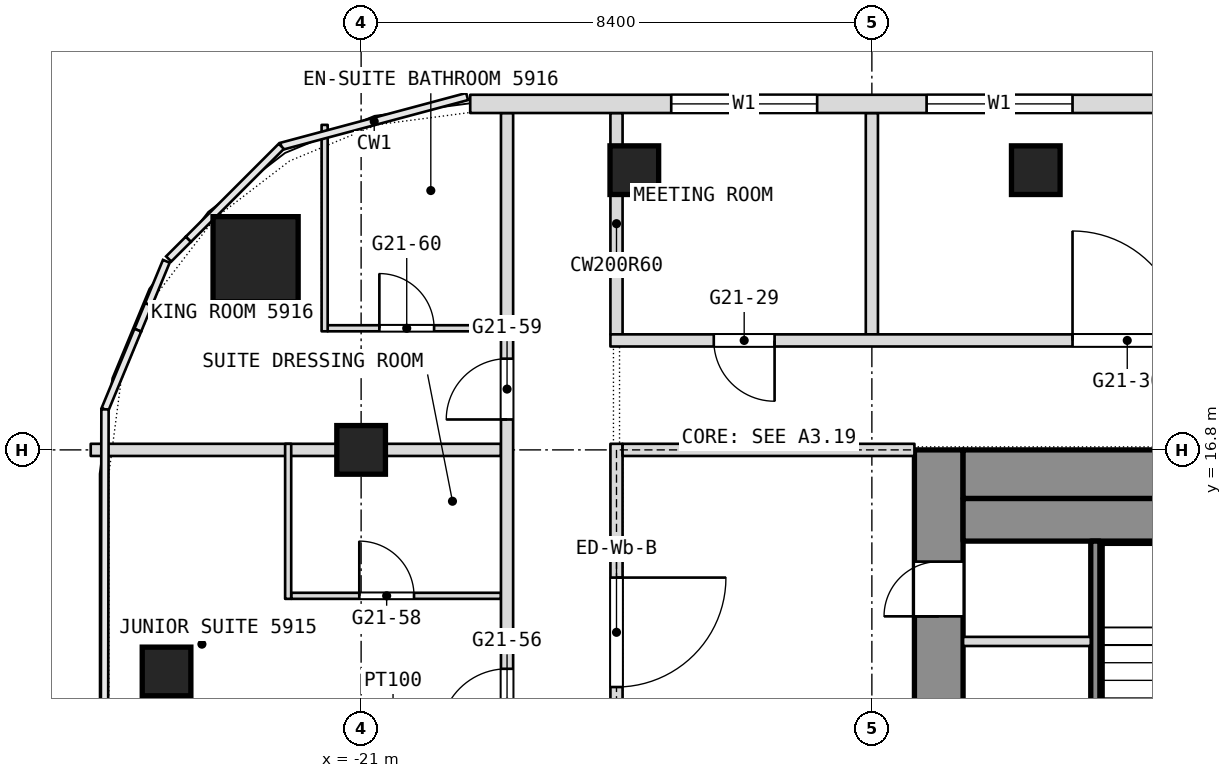
"""IFC4 building model, lengths in metres.
Left out: names, types, materials, properties, quantities, classifications, styles, units other than length and angle.
Written with IfcOpenShell. Run it as: python <this file> out.ifc"""

import sys

from ifc_helpers import new_model, si_unit, direction, frame, frame_2d, origin, origin_2d, place, context, subcontext, project, spatial, rectangle, extrude, element, fill, save


model = new_model("IFC4")
c1 = context("Model", 3, precision=1e-05, world=origin(), true_north=direction((0.0, 1.0)))
c2 = subcontext(c1, "Body", "Model", "MODEL_VIEW")
j1 = project(units=[si_unit("LENGTHUNIT", "METRE"), si_unit("PLANEANGLEUNIT", "RADIAN")], contexts=[c1])
p1 = place(None, origin())
s1 = spatial("IfcSite", under=j1, at=p1, CompositionType="ELEMENT")
p2 = place(p1, origin())
s2 = spatial("IfcBuilding", under=s1, at=p2, CompositionType="ELEMENT")
p3 = place(p2, frame((0.0, 0.0, 248.9)))
s3 = spatial("IfcBuildingStorey", under=s2, at=p3, CompositionType="ELEMENT", Elevation=248.9)
p4 = place(p3, frame((-11.5, 0.0, 0.0), z_axis=(0.0, 0.0, 1.0), x_axis=(0.0, 1.0, 0.0)))
e1 = element("IfcWall", 1, at=p4, inside=s3, PredefinedType="SHEAR", context=c2, shape_type="SweptSolid", body=[
    extrude(rectangle(XDim=16.8, YDim=0.8, at=frame_2d((8.4, 0.0))), origin(), (0.0, 0.0, 1.0), 3.6),
])
p5 = place(p4, frame((3.6, 0.0, 0.0)))
e2 = element("IfcOpeningElement", 2, at=p5, cuts=e1, PredefinedType="OPENING", context=c2, shape_type="SweptSolid", body=[
    extrude(rectangle(XDim=0.9, YDim=2.1, at=frame_2d((0.45, 1.05))), frame((0.0, 0.4, 0.0), z_axis=(0.0, -1.0, 0.0), x_axis=(1.0, 0.0, 0.0)), (0.0, 0.0, 1.0), 0.8),
])
p6 = place(p4, frame((6.825, 0.0, 0.0)))
e3 = element("IfcOpeningElement", 3, at=p6, cuts=e1, PredefinedType="OPENING", context=c2, shape_type="SweptSolid", body=[
    extrude(rectangle(XDim=1.2, YDim=2.1, at=frame_2d((0.6, 1.05))), frame((0.0, 0.4, 0.0), z_axis=(0.0, -1.0, 0.0), x_axis=(1.0, 0.0, 0.0)), (0.0, 0.0, 1.0), 0.8),
])
p7 = place(p4, frame((14.062, 0.0, 0.0)))
e4 = element("IfcOpeningElement", 4, at=p7, cuts=e1, PredefinedType="OPENING", context=c2, shape_type="SweptSolid", body=[
    extrude(rectangle(XDim=0.9, YDim=2.1, at=frame_2d((0.45, 1.05))), frame((0.0, 0.4, 0.0), z_axis=(0.0, -1.0, 0.0), x_axis=(1.0, 0.0, 0.0)), (0.0, 0.0, 1.0), 0.8),
])
p8 = place(p4, frame((11.438, 0.0, 0.0)))
e5 = element("IfcOpeningElement", 5, at=p8, cuts=e1, PredefinedType="OPENING", context=c2, shape_type="SweptSolid", body=[
    extrude(rectangle(XDim=0.9, YDim=2.1, at=frame_2d((0.45, 1.05))), frame((0.0, 0.4, 0.0), z_axis=(0.0, -1.0, 0.0), x_axis=(1.0, 0.0, 0.0)), (0.0, 0.0, 1.0), 0.8),
])
p9 = place(p4, frame((8.775, 0.0, 0.0)))
e6 = element("IfcOpeningElement", 6, at=p9, cuts=e1, PredefinedType="OPENING", context=c2, shape_type="SweptSolid", body=[
    extrude(rectangle(XDim=1.2, YDim=2.1, at=frame_2d((0.6, 1.05))), frame((0.0, 0.4, 0.0), z_axis=(0.0, -1.0, 0.0), x_axis=(1.0, 0.0, 0.0)), (0.0, 0.0, 1.0), 0.8),
])
p10 = place(p3, frame((-11.1, 16.4, 0.0), z_axis=(0.0, 0.0, 1.0), x_axis=(1.0, 0.0, 0.0)))
e7 = element("IfcWall", 7, at=p10, inside=s3, PredefinedType="SHEAR", context=c2, shape_type="SweptSolid", body=[
    extrude(rectangle(XDim=22.2, YDim=0.8, at=frame_2d((11.1, 0.0))), origin(), (0.0, 0.0, 1.0), 3.6),
])
p11 = place(p3, frame((-22.736, 19.936, 0.0), z_axis=(0.0, 0.0, 1.0), x_axis=(1.0, 0.0, 0.0)))
e8 = element("IfcColumn", 8, at=p11, inside=s3, PredefinedType="COLUMN", context=c2, shape_type="SweptSolid", body=[
    extrude(rectangle(XDim=1.4, YDim=1.4, at=origin_2d()), origin(), (0.0, 0.0, 1.0), 3.6),
])
for number, where, z_axis, x_axis in (
    (9, (-21.0, 16.8, 0.0), (0.0, 0.0, 1.0), (1.0, 0.0, 0.0)),
    (10, (-24.2, 13.156, 0.0), (0.0, 0.0, 1.0), (1.0, 0.0, 0.0)),
    (11, (-16.507, 21.4, 0.0), (0.0, 0.0, 1.0), (1.0, 0.0, 0.0)),
    (12, (-9.904, 21.4, 0.0), (0.0, 0.0, 1.0), (1.0, 0.0, 0.0)),
):
    element("IfcColumn", number, at=place(p3, frame(where, z_axis=z_axis, x_axis=x_axis)), inside=s3, PredefinedType="COLUMN", context=c2, shape_type="SweptSolid", body=[
        extrude(rectangle(XDim=0.8, YDim=0.8, at=origin_2d()), origin(), (0.0, 0.0, 1.0), 3.6),
    ])
p12 = place(p3, frame((-12.6, 18.7, 0.0), z_axis=(0.0, 0.0, 1.0), x_axis=(0.0, 1.0, 0.0)))
e13 = element("IfcWall", 13, at=p12, inside=s3, PredefinedType="PARTITIONING", context=c2, shape_type="SweptSolid", body=[
    extrude(rectangle(XDim=3.64, YDim=0.2, at=frame_2d((1.82, 0.0))), origin(), (0.0, 0.0, 1.0), 3.3),
])
p13 = place(p3, frame((-22.15, 14.4, 0.0), z_axis=(0.0, 0.0, 1.0), x_axis=(1.0, 0.0, 0.0)))
e14 = element("IfcWall", 14, at=p13, inside=s3, PredefinedType="PARTITIONING", context=c2, shape_type="SweptSolid", body=[
    extrude(rectangle(XDim=3.45, YDim=0.1, at=frame_2d((1.725, 0.0))), origin(), (0.0, 0.0, 1.0), 3.3),
])
p14 = place(p13, frame((1.12, 0.0, 0.0)))
e15 = element("IfcOpeningElement", 15, at=p14, cuts=e14, PredefinedType="OPENING", context=c2, shape_type="SweptSolid", body=[
    extrude(rectangle(XDim=0.9, YDim=2.1, at=frame_2d((0.45, 1.05))), frame((0.0, 0.05, 0.0), z_axis=(0.0, -1.0, 0.0), x_axis=(1.0, 0.0, 0.0)), (0.0, 0.0, 1.0), 0.1),
])
p15 = place(p3, frame((-16.8, 18.7, 0.0), z_axis=(0.0, 0.0, 1.0), x_axis=(0.0, 1.0, 0.0)))
e16 = element("IfcWall", 16, at=p15, inside=s3, PredefinedType="PARTITIONING", context=c2, shape_type="SweptSolid", body=[
    extrude(rectangle(XDim=3.64, YDim=0.2, at=frame_2d((1.82, 0.0))), origin(), (0.0, 0.0, 1.0), 3.3),
])
p16 = place(p3, frame((-25.447, 16.8, 0.0), z_axis=(0.0, 0.0, 1.0), x_axis=(1.0, 0.0, 0.0)))
e17 = element("IfcWall", 17, at=p16, inside=s3, PredefinedType="PARTITIONING", context=c2, shape_type="SweptSolid", body=[
    extrude(rectangle(XDim=6.747, YDim=0.2, at=frame_2d((3.374, 0.0))), origin(), (0.0, 0.0, 1.0), 2.9),
])
p17 = place(p3, frame((-18.6, -26.751, 0.0), z_axis=(0.0, 0.0, 1.0), x_axis=(0.0, 1.0, 0.0)))
e18 = element("IfcWall", 18, at=p17, inside=s3, PredefinedType="PARTITIONING", context=c2, shape_type="SweptSolid", body=[
    extrude(rectangle(XDim=49.091, YDim=0.2, at=frame_2d((24.545, 0.0))), origin(), (0.0, 0.0, 1.0), 3.3),
])
p18 = place(p17, frame((4.576, 0.0, 0.0)))
e19 = element("IfcOpeningElement", 19, at=p18, cuts=e18, PredefinedType="OPENING", context=c2, shape_type="SweptSolid", body=[
    extrude(rectangle(XDim=1.1, YDim=2.1, at=frame_2d((0.55, 1.05))), frame((0.0, 0.1, 0.0), z_axis=(0.0, -1.0, 0.0), x_axis=(1.0, 0.0, 0.0)), (0.0, 0.0, 1.0), 0.2),
])
p19 = place(p17, frame((13.551, 0.0, 0.0)))
e20 = element("IfcOpeningElement", 20, at=p19, cuts=e18, PredefinedType="OPENING", context=c2, shape_type="SweptSolid", body=[
    extrude(rectangle(XDim=1.1, YDim=2.1, at=frame_2d((0.55, 1.05))), frame((0.0, 0.1, 0.0), z_axis=(0.0, -1.0, 0.0), x_axis=(1.0, 0.0, 0.0)), (0.0, 0.0, 1.0), 0.2),
])
p20 = place(p17, frame((22.051, 0.0, 0.0)))
e21 = element("IfcOpeningElement", 21, at=p20, cuts=e18, PredefinedType="OPENING", context=c2, shape_type="SweptSolid", body=[
    extrude(rectangle(XDim=1.1, YDim=2.1, at=frame_2d((0.55, 1.05))), frame((0.0, 0.1, 0.0), z_axis=(0.0, -1.0, 0.0), x_axis=(1.0, 0.0, 0.0)), (0.0, 0.0, 1.0), 0.2),
])
p21 = place(p17, frame((30.351, 0.0, 0.0)))
e22 = element("IfcOpeningElement", 22, at=p21, cuts=e18, PredefinedType="OPENING", context=c2, shape_type="SweptSolid", body=[
    extrude(rectangle(XDim=1.1, YDim=2.1, at=frame_2d((0.55, 1.05))), frame((0.0, 0.1, 0.0), z_axis=(0.0, -1.0, 0.0), x_axis=(1.0, 0.0, 0.0)), (0.0, 0.0, 1.0), 0.2),
])
p22 = place(p17, frame((38.851, 0.0, 0.0)))
e23 = element("IfcOpeningElement", 23, at=p22, cuts=e18, PredefinedType="OPENING", context=c2, shape_type="SweptSolid", body=[
    extrude(rectangle(XDim=1.1, YDim=2.1, at=frame_2d((0.55, 1.05))), frame((0.0, 0.1, 0.0), z_axis=(0.0, -1.0, 0.0), x_axis=(1.0, 0.0, 0.0)), (0.0, 0.0, 1.0), 0.2),
])
p23 = place(p17, frame((44.051, 0.0, 0.0)))
e24 = element("IfcOpeningElement", 24, at=p23, cuts=e18, PredefinedType="OPENING", context=c2, shape_type="SweptSolid", body=[
    extrude(rectangle(XDim=1.0, YDim=2.1, at=frame_2d((0.5, 1.05))), frame((0.0, 0.1, 0.0), z_axis=(0.0, -1.0, 0.0), x_axis=(1.0, 0.0, 0.0)), (0.0, 0.0, 1.0), 0.2),
])
p24 = place(p3, frame((-16.9, 18.6, 0.0), z_axis=(0.0, 0.0, 1.0), x_axis=(1.0, 0.0, 0.0)))
e25 = element("IfcWall", 25, at=p24, inside=s3, PredefinedType="PARTITIONING", context=c2, shape_type="SweptSolid", body=[
    extrude(rectangle(XDim=33.8, YDim=0.2, at=frame_2d((16.9, 0.0))), origin(), (0.0, 0.0, 1.0), 3.3),
])
p25 = place(p24, frame((1.7, 0.0, 0.0)))
e26 = element("IfcOpeningElement", 26, at=p25, cuts=e25, PredefinedType="OPENING", context=c2, shape_type="SweptSolid", body=[
    extrude(rectangle(XDim=1.0, YDim=2.1, at=frame_2d((0.5, 1.05))), frame((0.0, 0.1, 0.0), z_axis=(0.0, -1.0, 0.0), x_axis=(1.0, 0.0, 0.0)), (0.0, 0.0, 1.0), 0.2),
])
p26 = place(p24, frame((7.6, 0.0, 0.0)))
e27 = element("IfcOpeningElement", 27, at=p26, cuts=e25, PredefinedType="OPENING", context=c2, shape_type="SweptSolid", body=[
    extrude(rectangle(XDim=1.8, YDim=2.1, at=frame_2d((0.9, 1.05))), frame((0.0, 0.1, 0.0), z_axis=(0.0, -1.0, 0.0), x_axis=(1.0, 0.0, 0.0)), (0.0, 0.0, 1.0), 0.2),
])
p27 = place(p24, frame((16.0, 0.0, 0.0)))
e28 = element("IfcOpeningElement", 28, at=p27, cuts=e25, PredefinedType="OPENING", context=c2, shape_type="SweptSolid", body=[
    extrude(rectangle(XDim=1.8, YDim=2.1, at=frame_2d((0.9, 1.05))), frame((0.0, 0.1, 0.0), z_axis=(0.0, -1.0, 0.0), x_axis=(1.0, 0.0, 0.0)), (0.0, 0.0, 1.0), 0.2),
])
p28 = place(p24, frame((31.1, 0.0, 0.0)))
e29 = element("IfcOpeningElement", 29, at=p28, cuts=e25, PredefinedType="OPENING", context=c2, shape_type="SweptSolid", body=[
    extrude(rectangle(XDim=1.0, YDim=2.1, at=frame_2d((0.5, 1.05))), frame((0.0, 0.1, 0.0), z_axis=(0.0, -1.0, 0.0), x_axis=(1.0, 0.0, 0.0)), (0.0, 0.0, 1.0), 0.2),
])
p29 = place(p24, frame((22.7, 0.0, 0.0)))
e30 = element("IfcOpeningElement", 30, at=p29, cuts=e25, PredefinedType="OPENING", context=c2, shape_type="SweptSolid", body=[
    extrude(rectangle(XDim=1.0, YDim=2.1, at=frame_2d((0.5, 1.05))), frame((0.0, 0.1, 0.0), z_axis=(0.0, -1.0, 0.0), x_axis=(1.0, 0.0, 0.0)), (0.0, 0.0, 1.0), 0.2),
])
p30 = place(p24, frame((26.9, 0.0, 0.0)))
e31 = element("IfcOpeningElement", 31, at=p30, cuts=e25, PredefinedType="OPENING", context=c2, shape_type="SweptSolid", body=[
    extrude(rectangle(XDim=1.0, YDim=2.1, at=frame_2d((0.5, 1.05))), frame((0.0, 0.1, 0.0), z_axis=(0.0, -1.0, 0.0), x_axis=(1.0, 0.0, 0.0)), (0.0, 0.0, 1.0), 0.2),
])
p31 = place(p3, frame((-21.55, 18.8, 0.0), z_axis=(0.0, 0.0, 1.0), x_axis=(1.0, 0.0, 0.0)))
e32 = element("IfcWall", 32, at=p31, inside=s3, PredefinedType="PARTITIONING", context=c2, shape_type="SweptSolid", body=[
    extrude(rectangle(XDim=2.85, YDim=0.1, at=frame_2d((1.425, 0.0))), origin(), (0.0, 0.0, 1.0), 3.3),
])
p32 = place(p31, frame((0.85, 0.0, 0.0)))
e33 = element("IfcOpeningElement", 33, at=p32, cuts=e32, PredefinedType="OPENING", context=c2, shape_type="SweptSolid", body=[
    extrude(rectangle(XDim=0.9, YDim=2.1, at=frame_2d((0.45, 1.05))), frame((0.0, 0.05, 0.0), z_axis=(0.0, -1.0, 0.0), x_axis=(1.0, 0.0, 0.0)), (0.0, 0.0, 1.0), 0.1),
])
p33 = place(p3, frame((-21.6, 18.75, 0.0), z_axis=(0.0, 0.0, 1.0), x_axis=(0.0, 1.0, 0.0)))
e34 = element("IfcWall", 34, at=p33, inside=s3, PredefinedType="PARTITIONING", context=c2, shape_type="SweptSolid", body=[
    extrude(rectangle(XDim=3.395, YDim=0.1, at=frame_2d((1.698, 0.0))), origin(), (0.0, 0.0, 1.0), 3.3),
])
p34 = place(p3, frame((-22.2, 14.35, 0.0), z_axis=(0.0, 0.0, 1.0), x_axis=(0.0, 1.0, 0.0)))
e35 = element("IfcWall", 35, at=p34, inside=s3, PredefinedType="PARTITIONING", context=c2, shape_type="SweptSolid", body=[
    extrude(rectangle(XDim=2.55, YDim=0.1, at=frame_2d((1.275, 0.0))), origin(), (0.0, 0.0, 1.0), 3.3),
])
p35 = place(p3, frame((19.206, 22.49, 0.0), z_axis=(0.0, 0.0, 1.0), x_axis=(-1.0, 0.0, 0.0)))
e36 = element("IfcWall", 36, at=p35, inside=s3, PredefinedType="NOTDEFINED", context=c2, shape_type="SweptSolid", body=[
    extrude(rectangle(XDim=38.412, YDim=0.3, at=frame_2d((19.206, 0.0))), origin(), (0.0, 0.0, 1.0), 3.6),
])
p36 = place(p35, frame((3.306, 0.0, 0.9)))
e37 = element("IfcOpeningElement", 37, at=p36, cuts=e36, PredefinedType="OPENING", context=c2, shape_type="SweptSolid", body=[
    extrude(rectangle(XDim=2.4, YDim=2.1, at=frame_2d((1.2, 1.05))), frame((0.0, 0.15, 0.0), z_axis=(0.0, -1.0, 0.0), x_axis=(1.0, 0.0, 0.0)), (0.0, 0.0, 1.0), 0.3),
])
p37 = place(p35, frame((7.506, 0.0, 0.9)))
e38 = element("IfcOpeningElement", 38, at=p37, cuts=e36, PredefinedType="OPENING", context=c2, shape_type="SweptSolid", body=[
    extrude(rectangle(XDim=2.4, YDim=2.1, at=frame_2d((1.2, 1.05))), frame((0.0, 0.15, 0.0), z_axis=(0.0, -1.0, 0.0), x_axis=(1.0, 0.0, 0.0)), (0.0, 0.0, 1.0), 0.3),
])
p38 = place(p35, frame((11.706, 0.0, 0.9)))
e39 = element("IfcOpeningElement", 39, at=p38, cuts=e36, PredefinedType="OPENING", context=c2, shape_type="SweptSolid", body=[
    extrude(rectangle(XDim=2.4, YDim=2.1, at=frame_2d((1.2, 1.05))), frame((0.0, 0.15, 0.0), z_axis=(0.0, -1.0, 0.0), x_axis=(1.0, 0.0, 0.0)), (0.0, 0.0, 1.0), 0.3),
])
p39 = place(p35, frame((15.906, 0.0, 0.9)))
e40 = element("IfcOpeningElement", 40, at=p39, cuts=e36, PredefinedType="OPENING", context=c2, shape_type="SweptSolid", body=[
    extrude(rectangle(XDim=2.4, YDim=2.1, at=frame_2d((1.2, 1.05))), frame((0.0, 0.15, 0.0), z_axis=(0.0, -1.0, 0.0), x_axis=(1.0, 0.0, 0.0)), (0.0, 0.0, 1.0), 0.3),
])
p40 = place(p35, frame((20.106, 0.0, 0.9)))
e41 = element("IfcOpeningElement", 41, at=p40, cuts=e36, PredefinedType="OPENING", context=c2, shape_type="SweptSolid", body=[
    extrude(rectangle(XDim=2.4, YDim=2.1, at=frame_2d((1.2, 1.05))), frame((0.0, 0.15, 0.0), z_axis=(0.0, -1.0, 0.0), x_axis=(1.0, 0.0, 0.0)), (0.0, 0.0, 1.0), 0.3),
])
p41 = place(p35, frame((24.306, 0.0, 0.9)))
e42 = element("IfcOpeningElement", 42, at=p41, cuts=e36, PredefinedType="OPENING", context=c2, shape_type="SweptSolid", body=[
    extrude(rectangle(XDim=2.4, YDim=2.1, at=frame_2d((1.2, 1.05))), frame((0.0, 0.15, 0.0), z_axis=(0.0, -1.0, 0.0), x_axis=(1.0, 0.0, 0.0)), (0.0, 0.0, 1.0), 0.3),
])
p42 = place(p35, frame((28.506, 0.0, 0.9)))
e43 = element("IfcOpeningElement", 43, at=p42, cuts=e36, PredefinedType="OPENING", context=c2, shape_type="SweptSolid", body=[
    extrude(rectangle(XDim=2.4, YDim=2.1, at=frame_2d((1.2, 1.05))), frame((0.0, 0.15, 0.0), z_axis=(0.0, -1.0, 0.0), x_axis=(1.0, 0.0, 0.0)), (0.0, 0.0, 1.0), 0.3),
])
p43 = place(p35, frame((32.706, 0.0, 0.9)))
e44 = element("IfcOpeningElement", 44, at=p43, cuts=e36, PredefinedType="OPENING", context=c2, shape_type="SweptSolid", body=[
    extrude(rectangle(XDim=2.4, YDim=2.1, at=frame_2d((1.2, 1.05))), frame((0.0, 0.15, 0.0), z_axis=(0.0, -1.0, 0.0), x_axis=(1.0, 0.0, 0.0)), (0.0, 0.0, 1.0), 0.3),
])
p44 = place(p3, frame((-11.1, 15.65, 0.0), z_axis=(0.0, 0.0, 1.0), x_axis=(1.0, 0.0, 0.0)))
e45 = element("IfcWall", 45, at=p44, inside=s3, PredefinedType="PARTITIONING", context=c2, shape_type="SweptSolid", body=[
    extrude(rectangle(XDim=22.2, YDim=0.7, at=frame_2d((11.1, 0.0))), origin(), (0.0, 0.0, 1.0), 3.3),
])
p45 = place(p3, frame((-8.925, 8.7, 0.0), z_axis=(0.0, 0.0, 1.0), x_axis=(0.0, 1.0, 0.0)))
e46 = element("IfcWall", 46, at=p45, inside=s3, PredefinedType="SHEAR", context=c2, shape_type="SweptSolid", body=[
    extrude(rectangle(XDim=6.6, YDim=0.15, at=frame_2d((3.3, 0.0))), origin(), (0.0, 0.0, 1.0), 3.3),
])
p46 = place(p45, frame((0.075, 0.0, 0.0)))
e47 = element("IfcOpeningElement", 47, at=p46, cuts=e46, PredefinedType="OPENING", context=c2, shape_type="SweptSolid", body=[
    extrude(rectangle(XDim=1.2, YDim=2.1, at=frame_2d((0.6, 1.05))), frame((0.0, 0.075, 0.0), z_axis=(0.0, -1.0, 0.0), x_axis=(1.0, 0.0, 0.0)), (0.0, 0.0, 1.0), 0.15),
])
p47 = place(p3, frame((-11.1, 13.65, 0.0), z_axis=(0.0, 0.0, 1.0), x_axis=(1.0, 0.0, 0.0)))
e48 = element("IfcWall", 48, at=p47, inside=s3, PredefinedType="PARTITIONING", context=c2, shape_type="SweptSolid", body=[
    extrude(rectangle(XDim=2.1, YDim=0.15, at=frame_2d((1.05, 0.0))), origin(), (0.0, 0.0, 1.0), 3.3),
])
p48 = place(p3, frame((-16.8, -0.1, 0.0), z_axis=(0.0, 0.0, 1.0), x_axis=(0.0, 1.0, 0.0)))
e49 = element("IfcWall", 49, at=p48, inside=s3, PredefinedType="PARTITIONING", context=c2, shape_type="SweptSolid", body=[
    extrude(rectangle(XDim=17.0, YDim=0.2, at=frame_2d((8.5, 0.0))), origin(), (0.0, 0.0, 1.0), 3.3),
])
p49 = place(p48, frame((2.2, 0.0, 0.0)))
e50 = element("IfcOpeningElement", 50, at=p49, cuts=e49, PredefinedType="OPENING", context=c2, shape_type="SweptSolid", body=[
    extrude(rectangle(XDim=1.8, YDim=2.1, at=frame_2d((0.9, 1.05))), frame((0.0, 0.1, 0.0), z_axis=(0.0, -1.0, 0.0), x_axis=(1.0, 0.0, 0.0)), (0.0, 0.0, 1.0), 0.2),
])
p50 = place(p48, frame((13.0, 0.0, 0.0)))
e51 = element("IfcOpeningElement", 51, at=p50, cuts=e49, PredefinedType="OPENING", context=c2, shape_type="SweptSolid", body=[
    extrude(rectangle(XDim=1.8, YDim=2.1, at=frame_2d((0.9, 1.05))), frame((0.0, 0.1, 0.0), z_axis=(0.0, -1.0, 0.0), x_axis=(1.0, 0.0, 0.0)), (0.0, 0.0, 1.0), 0.2),
])
p51 = place(p3, frame((-16.7, 16.8, 0.0), z_axis=(0.0, 0.0, 1.0), x_axis=(1.0, 0.0, 0.0)))
e52 = element("IfcWall", 52, at=p51, inside=s3, PredefinedType="PARTITIONING", context=c2, shape_type="SweptSolid", body=[
    extrude(rectangle(XDim=4.8, YDim=0.2, at=frame_2d((2.4, 0.0))), origin(), (0.0, 0.0, 1.0), 2.9),
])
p52 = place(p14, origin())
e53 = element("IfcDoor", 53, at=p52, inside=s3, OperationType="SINGLE_SWING_LEFT", PredefinedType="DOOR", context=c2, shape_type="SweptSolid", body=[
    extrude(rectangle(XDim=0.9, YDim=2.1, at=frame_2d((0.45, 1.05))), frame((0.0, 0.025, 0.0), z_axis=(0.0, -1.0, 0.0), x_axis=(1.0, 0.0, 0.0)), (0.0, 0.0, 1.0), 0.05),
])
fill(e15, e53)
p53 = place(p22, origin())
e54 = element("IfcDoor", 54, at=p53, inside=s3, OperationType="SINGLE_SWING_LEFT", PredefinedType="DOOR", context=c2, shape_type="SweptSolid", body=[
    extrude(rectangle(XDim=1.1, YDim=2.1, at=frame_2d((0.55, 1.05))), frame((0.0, 0.025, 0.0), z_axis=(0.0, -1.0, 0.0), x_axis=(1.0, 0.0, 0.0)), (0.0, 0.0, 1.0), 0.05),
])
fill(e23, e54)
p54 = place(p23, origin())
e55 = element("IfcDoor", 55, at=p54, inside=s3, OperationType="SINGLE_SWING_RIGHT", PredefinedType="DOOR", context=c2, shape_type="SweptSolid", body=[
    extrude(rectangle(XDim=1.0, YDim=2.1, at=frame_2d((0.5, 1.05))), frame((0.0, 0.025, 0.0), z_axis=(0.0, -1.0, 0.0), x_axis=(1.0, 0.0, 0.0)), (0.0, 0.0, 1.0), 0.05),
])
fill(e24, e55)
p55 = place(p25, origin())
e56 = element("IfcDoor", 56, at=p55, inside=s3, OperationType="SINGLE_SWING_LEFT", PredefinedType="DOOR", context=c2, shape_type="SweptSolid", body=[
    extrude(rectangle(XDim=1.0, YDim=2.1, at=frame_2d((0.5, 1.05))), frame((0.0, 0.025, 0.0), z_axis=(0.0, -1.0, 0.0), x_axis=(1.0, 0.0, 0.0)), (0.0, 0.0, 1.0), 0.05),
])
fill(e26, e56)
p56 = place(p26, origin())
e57 = element("IfcDoor", 57, at=p56, inside=s3, OperationType="DOUBLE_DOOR_SINGLE_SWING", PredefinedType="DOOR", context=c2, shape_type="SweptSolid", body=[
    extrude(rectangle(XDim=1.8, YDim=2.1, at=frame_2d((0.9, 1.05))), frame((0.0, 0.025, 0.0), z_axis=(0.0, -1.0, 0.0), x_axis=(1.0, 0.0, 0.0)), (0.0, 0.0, 1.0), 0.05),
])
fill(e27, e57)
p57 = place(p32, origin())
e58 = element("IfcDoor", 58, at=p57, inside=s3, OperationType="SINGLE_SWING_LEFT", PredefinedType="DOOR", context=c2, shape_type="SweptSolid", body=[
    extrude(rectangle(XDim=0.9, YDim=2.1, at=frame_2d((0.45, 1.05))), frame((0.0, 0.025, 0.0), z_axis=(0.0, -1.0, 0.0), x_axis=(1.0, 0.0, 0.0)), (0.0, 0.0, 1.0), 0.05),
])
fill(e33, e58)
p58 = place(p42, origin())
e59 = element("IfcWindow", 59, at=p58, inside=s3, PartitioningType="SINGLE_PANEL", PredefinedType="WINDOW", context=c2, shape_type="SweptSolid", body=[
    extrude(rectangle(XDim=2.4, YDim=2.1, at=frame_2d((1.2, 1.05))), frame((0.0, 0.03, 0.0), z_axis=(0.0, -1.0, 0.0), x_axis=(1.0, 0.0, 0.0)), (0.0, 0.0, 1.0), 0.06),
])
fill(e43, e59)
p59 = place(p43, origin())
e60 = element("IfcWindow", 60, at=p59, inside=s3, PartitioningType="SINGLE_PANEL", PredefinedType="WINDOW", context=c2, shape_type="SweptSolid", body=[
    extrude(rectangle(XDim=2.4, YDim=2.1, at=frame_2d((1.2, 1.05))), frame((0.0, 0.03, 0.0), z_axis=(0.0, -1.0, 0.0), x_axis=(1.0, 0.0, 0.0)), (0.0, 0.0, 1.0), 0.06),
])
fill(e44, e60)
p60 = place(p7, origin())
e61 = element("IfcDoor", 61, at=p60, inside=s3, OperationType="SINGLE_SWING_LEFT", PredefinedType="DOOR", context=c2, shape_type="SweptSolid", body=[
    extrude(rectangle(XDim=0.9, YDim=2.1, at=frame_2d((0.45, 1.05))), frame((0.0, 0.025, 0.0), z_axis=(0.0, -1.0, 0.0), x_axis=(1.0, 0.0, 0.0)), (0.0, 0.0, 1.0), 0.05),
])
fill(e4, e61)
p61 = place(p50, origin())
e62 = element("IfcDoor", 62, at=p61, inside=s3, OperationType="DOUBLE_DOOR_SINGLE_SWING", PredefinedType="DOOR", context=c2, shape_type="SweptSolid", body=[
    extrude(rectangle(XDim=1.8, YDim=2.1, at=frame_2d((0.9, 1.05))), frame((0.0, 0.025, 0.0), z_axis=(0.0, -1.0, 0.0), x_axis=(1.0, 0.0, 0.0)), (0.0, 0.0, 1.0), 0.05),
])
fill(e51, e62)
save(model, sys.argv[1])
